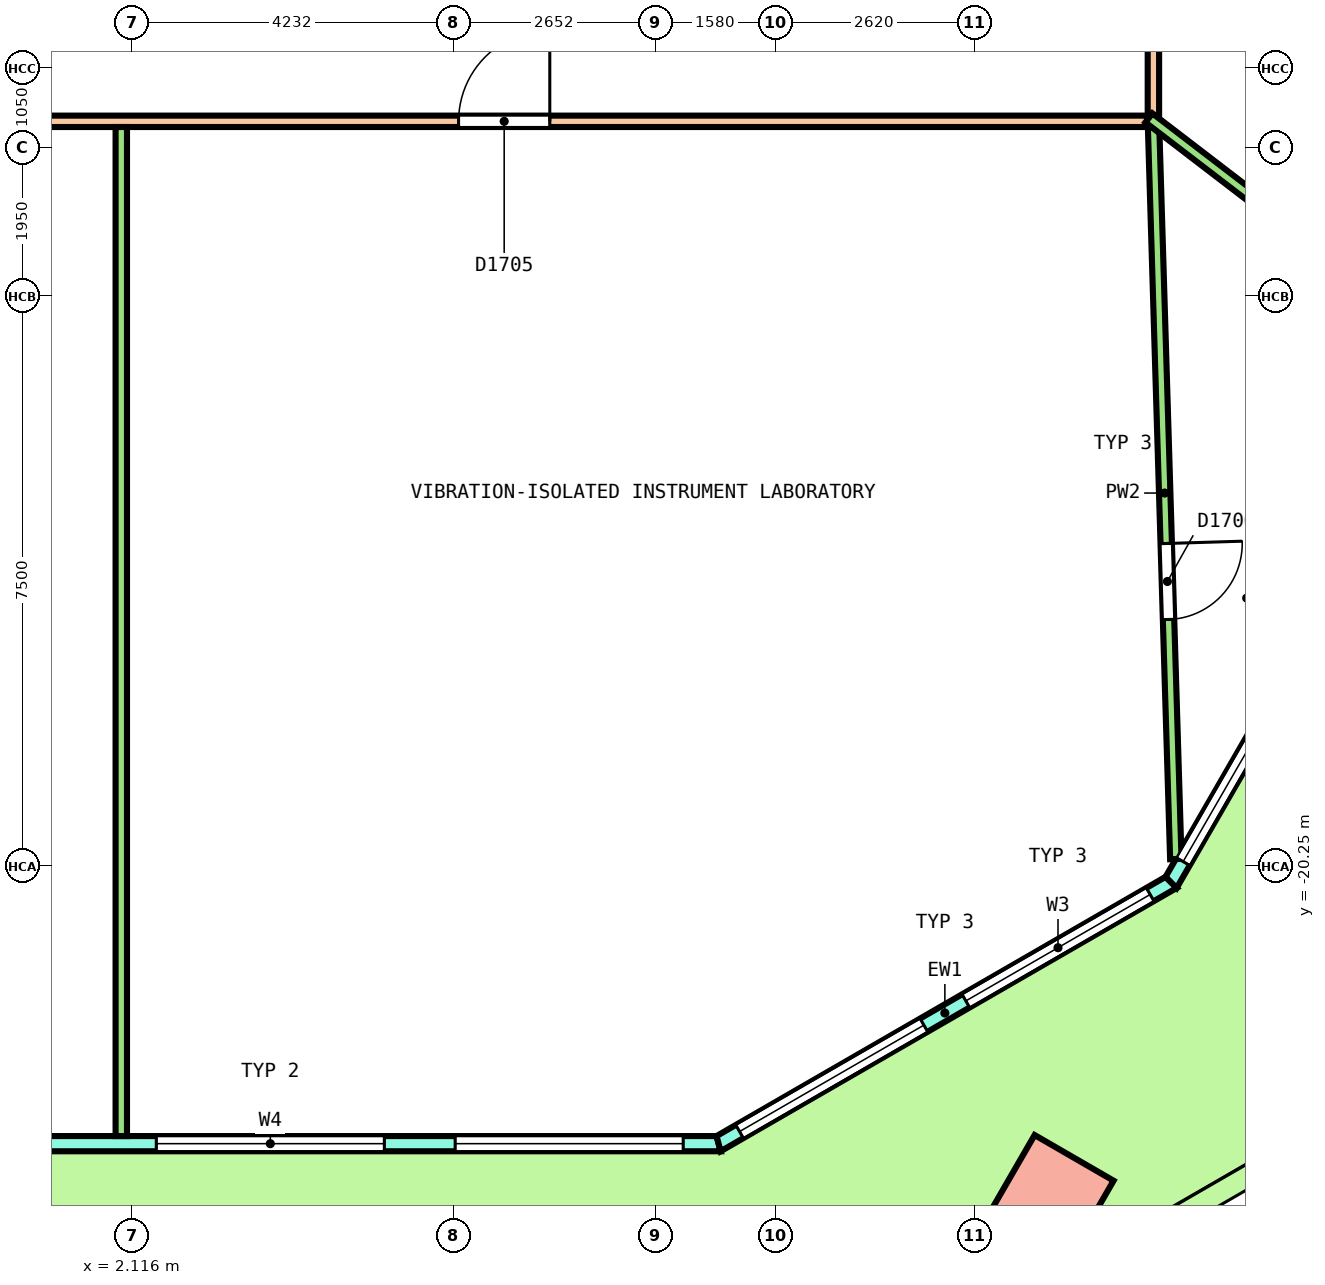
"""IFC4 building model, lengths in metres.
Left out: names, types, materials, properties, quantities, classifications, styles, units other than length and angle.
Written with IfcOpenShell. Run it as: python <this file> out.ifc"""

import sys

from ifc_helpers import new_model, si_unit, direction, frame, frame_2d, origin, origin_2d, place, context, subcontext, project, spatial, polyline, rectangle, outline, extrude, element, fill, save


model = new_model("IFC4")
c1 = context("Model", 3, precision=1e-05, world=origin(), true_north=direction((0.0, 1.0)))
c2 = subcontext(c1, "Body", "Model", "MODEL_VIEW")
j1 = project(units=[si_unit("LENGTHUNIT", "METRE"), si_unit("PLANEANGLEUNIT", "RADIAN")], contexts=[c1])
p1 = place(None, origin())
s1 = spatial("IfcSite", under=j1, at=p1, CompositionType="ELEMENT")
p2 = place(p1, origin())
s2 = spatial("IfcBuilding", under=s1, at=p2, CompositionType="ELEMENT")
p3 = place(p2, frame((0.0, 0.0, 145.2)))
s3 = spatial("IfcBuildingStorey", under=s2, at=p3, CompositionType="ELEMENT", Elevation=145.2)
p4 = place(p3, frame((14.206, -24.606, 0.0), z_axis=(-0.018132630042, -0.031385715123, 0.999342856388), x_axis=(0.866156195426, 0.498787200508, 0.031381104725)))
e1 = element("IfcColumn", 1, at=p4, inside=s3, PredefinedType="COLUMN", context=c2, shape_type="SweptSolid", body=[
    extrude(rectangle(XDim=1.2, YDim=1.2, at=origin_2d()), origin(), (0.0, 0.0, 1.0), 4.053),
])
p5 = place(p3, frame((-9.83, -23.9, 0.0), z_axis=(0.0, 0.0, 1.0), x_axis=(1.0, 0.0, 0.0)))
e2 = element("IfcWall", 2, at=p5, inside=s3, PredefinedType="SOLIDWALL", context=c2, shape_type="SweptSolid", body=[
    extrude(outline(polyline([(-0.027, -0.1), (1.011, -0.1), (2.048, -0.1), (3.086, -0.1), (4.123, -0.1), (5.161, -0.1), (6.198, -0.1), (7.236, -0.1), (8.273, -0.1), (9.311, -0.1), (10.348, -0.1), (11.386, -0.1), (12.423, -0.1), (13.461, -0.1), (14.499, -0.1), (15.536, -0.1), (16.573, -0.1), (17.611, -0.1), (18.648, -0.1), (19.686, -0.1), (19.632, 0.1), (18.6, 0.1), (17.569, 0.1), (16.537, 0.1), (15.505, 0.1), (14.473, 0.1), (13.441, 0.1), (12.409, 0.1), (11.377, 0.1), (10.345, 0.1), (9.314, 0.1), (8.282, 0.1), (7.25, 0.1), (6.218, 0.1), (5.186, 0.1), (4.154, 0.1), (3.123, 0.1), (2.091, 0.1), (1.059, 0.1), (0.027, 0.1), (-0.027, -0.1)])), origin(), (0.0, 0.0, 1.0), 4.1),
])
p6 = place(p5, frame((0.466, 0.0, 0.1)))
e3 = element("IfcOpeningElement", 3, at=p6, cuts=e2, PredefinedType="OPENING", context=c2, shape_type="SweptSolid", body=[
    extrude(rectangle(XDim=3.0, YDim=2.9, at=frame_2d((1.5, 1.45))), frame((0.0, 0.11, 0.0), z_axis=(0.0, -1.0, 0.0), x_axis=(1.0, 0.0, 0.0)), (0.0, 0.0, 1.0), 0.22),
])
p7 = place(p5, frame((4.398, 0.0, 0.1)))
e4 = element("IfcOpeningElement", 4, at=p7, cuts=e2, PredefinedType="OPENING", context=c2, shape_type="SweptSolid", body=[
    extrude(rectangle(XDim=3.0, YDim=2.9, at=frame_2d((1.5, 1.45))), frame((0.0, 0.11, 0.0), z_axis=(0.0, -1.0, 0.0), x_axis=(1.0, 0.0, 0.0)), (0.0, 0.0, 1.0), 0.22),
])
p8 = place(p5, frame((8.93, 0.0, 0.0)))
e5 = element("IfcOpeningElement", 5, at=p8, cuts=e2, PredefinedType="OPENING", context=c2, shape_type="SweptSolid", body=[
    extrude(rectangle(XDim=1.8, YDim=2.4, at=frame_2d((0.9, 1.2))), frame((0.0, 0.11, 0.0), z_axis=(0.0, -1.0, 0.0), x_axis=(1.0, 0.0, 0.0)), (0.0, 0.0, 1.0), 0.22),
])
p9 = place(p5, frame((8.93, 0.0, 2.55)))
e6 = element("IfcOpeningElement", 6, at=p9, cuts=e2, PredefinedType="OPENING", context=c2, shape_type="SweptSolid", body=[
    extrude(rectangle(XDim=1.8, YDim=0.45, at=frame_2d((0.9, 0.225))), frame((0.0, 0.11, 0.0), z_axis=(0.0, -1.0, 0.0), x_axis=(1.0, 0.0, 0.0)), (0.0, 0.0, 1.0), 0.22),
])
p10 = place(p5, frame((12.261, 0.0, 0.1)))
e7 = element("IfcOpeningElement", 7, at=p10, cuts=e2, PredefinedType="OPENING", context=c2, shape_type="SweptSolid", body=[
    extrude(rectangle(XDim=3.0, YDim=2.9, at=frame_2d((1.5, 1.45))), frame((0.0, 0.11, 0.0), z_axis=(0.0, -1.0, 0.0), x_axis=(1.0, 0.0, 0.0)), (0.0, 0.0, 1.0), 0.22),
])
p11 = place(p5, frame((16.193, 0.0, 0.1)))
e8 = element("IfcOpeningElement", 8, at=p11, cuts=e2, PredefinedType="OPENING", context=c2, shape_type="SweptSolid", body=[
    extrude(rectangle(XDim=3.0, YDim=2.9, at=frame_2d((1.5, 1.45))), frame((0.0, 0.11, 0.0), z_axis=(0.0, -1.0, 0.0), x_axis=(1.0, 0.0, 0.0)), (0.0, 0.0, 1.0), 0.22),
])
p12 = place(p3, frame((9.83, -23.9, 0.0), z_axis=(0.0, 0.0, 1.0), x_axis=(0.866029458321, 0.49999297727, 0.0)))
e9 = element("IfcWall", 9, at=p12, inside=s3, PredefinedType="SOLIDWALL", context=c2, shape_type="SweptSolid", body=[
    extrude(outline(polyline([(-0.027, -0.1), (1.128, -0.1), (2.282, -0.1), (3.437, -0.1), (4.592, -0.1), (5.747, -0.1), (6.901, -0.1), (6.848, 0.1), (5.711, 0.1), (4.574, 0.1), (3.437, 0.1), (2.301, 0.1), (1.164, 0.1), (0.027, 0.1), (-0.027, -0.1)])), origin(), (0.0, 0.0, 1.0), 4.1),
])
p13 = place(p12, frame((0.319, 0.0, 0.1)))
e10 = element("IfcOpeningElement", 10, at=p13, cuts=e9, PredefinedType="OPENING", context=c2, shape_type="SweptSolid", body=[
    extrude(rectangle(XDim=2.8, YDim=2.9, at=frame_2d((1.4, 1.45))), frame((0.0, 0.11, 0.0), z_axis=(0.0, -1.0, 0.0), x_axis=(1.0, 0.0, 0.0)), (0.0, 0.0, 1.0), 0.22),
])
p14 = place(p12, frame((3.756, 0.0, 0.1)))
e11 = element("IfcOpeningElement", 11, at=p14, cuts=e9, PredefinedType="OPENING", context=c2, shape_type="SweptSolid", body=[
    extrude(rectangle(XDim=2.8, YDim=2.9, at=frame_2d((1.4, 1.45))), frame((0.0, 0.11, 0.0), z_axis=(0.0, -1.0, 0.0), x_axis=(1.0, 0.0, 0.0)), (0.0, 0.0, 1.0), 0.22),
])
p15 = place(p3, frame((15.783, -20.463, 0.0), z_axis=(0.0, 0.0, 1.0), x_axis=(0.499999083763, 0.866025932773, 0.0)))
e12 = element("IfcWall", 12, at=p15, inside=s3, PredefinedType="SOLIDWALL", context=c2, shape_type="SweptSolid", body=[
    extrude(outline(polyline([(-0.027, -0.1), (1.011, -0.1), (2.048, -0.1), (3.086, -0.1), (4.123, -0.1), (5.161, -0.1), (6.198, -0.1), (7.236, -0.1), (8.273, -0.1), (9.311, -0.1), (10.348, -0.1), (11.386, -0.1), (12.423, -0.1), (13.461, -0.1), (14.499, -0.1), (15.536, -0.1), (16.573, -0.1), (17.611, -0.1), (18.648, -0.1), (19.686, -0.1), (19.632, 0.1), (18.6, 0.1), (17.569, 0.1), (16.537, 0.1), (15.505, 0.1), (14.473, 0.1), (13.441, 0.1), (12.409, 0.1), (11.377, 0.1), (10.345, 0.1), (9.314, 0.1), (8.282, 0.1), (7.25, 0.1), (6.218, 0.1), (5.186, 0.1), (4.154, 0.1), (3.123, 0.1), (2.091, 0.1), (1.059, 0.1), (0.027, 0.1), (-0.027, -0.1)])), origin(), (0.0, 0.0, 1.0), 4.1),
])
p16 = place(p15, frame((0.316, 0.0, 0.1)))
e13 = element("IfcOpeningElement", 13, at=p16, cuts=e12, PredefinedType="OPENING", context=c2, shape_type="SweptSolid", body=[
    extrude(rectangle(XDim=3.3, YDim=2.9, at=frame_2d((1.65, 1.45))), frame((0.0, 0.11, 0.0), z_axis=(0.0, -1.0, 0.0), x_axis=(1.0, 0.0, 0.0)), (0.0, 0.0, 1.0), 0.22),
])
p17 = place(p15, frame((4.248, 0.0, 0.1)))
e14 = element("IfcOpeningElement", 14, at=p17, cuts=e12, PredefinedType="OPENING", context=c2, shape_type="SweptSolid", body=[
    extrude(rectangle(XDim=3.3, YDim=2.9, at=frame_2d((1.65, 1.45))), frame((0.0, 0.11, 0.0), z_axis=(0.0, -1.0, 0.0), x_axis=(1.0, 0.0, 0.0)), (0.0, 0.0, 1.0), 0.22),
])
p18 = place(p15, frame((8.93, 0.0, 0.0)))
e15 = element("IfcOpeningElement", 15, at=p18, cuts=e12, PredefinedType="OPENING", context=c2, shape_type="SweptSolid", body=[
    extrude(rectangle(XDim=1.8, YDim=2.4, at=frame_2d((0.9, 1.2))), frame((0.0, 0.11, 0.0), z_axis=(0.0, -1.0, 0.0), x_axis=(1.0, 0.0, 0.0)), (0.0, 0.0, 1.0), 0.22),
])
p19 = place(p15, frame((8.93, 0.0, 2.55)))
e16 = element("IfcOpeningElement", 16, at=p19, cuts=e12, PredefinedType="OPENING", context=c2, shape_type="SweptSolid", body=[
    extrude(rectangle(XDim=1.8, YDim=0.45, at=frame_2d((0.9, 0.225))), frame((0.0, 0.11, 0.0), z_axis=(0.0, -1.0, 0.0), x_axis=(1.0, 0.0, 0.0)), (0.0, 0.0, 1.0), 0.22),
])
p20 = place(p15, frame((12.112, 0.0, 0.1)))
e17 = element("IfcOpeningElement", 17, at=p20, cuts=e12, PredefinedType="OPENING", context=c2, shape_type="SweptSolid", body=[
    extrude(rectangle(XDim=3.3, YDim=2.9, at=frame_2d((1.65, 1.45))), frame((0.0, 0.11, 0.0), z_axis=(0.0, -1.0, 0.0), x_axis=(1.0, 0.0, 0.0)), (0.0, 0.0, 1.0), 0.22),
])
p21 = place(p15, frame((16.043, 0.0, 0.1)))
e18 = element("IfcOpeningElement", 18, at=p21, cuts=e12, PredefinedType="OPENING", context=c2, shape_type="SweptSolid", body=[
    extrude(rectangle(XDim=3.3, YDim=2.9, at=frame_2d((1.65, 1.45))), frame((0.0, 0.11, 0.0), z_axis=(0.0, -1.0, 0.0), x_axis=(1.0, 0.0, 0.0)), (0.0, 0.0, 1.0), 0.22),
])
p22 = place(p3, frame((15.55, -10.375, 0.0), z_axis=(0.0, 0.0, 1.0), x_axis=(0.0, 1.0, 0.0)))
e19 = element("IfcWall", 19, at=p22, inside=s3, PredefinedType="PARTITIONING", context=c2, shape_type="SweptSolid", body=[
    extrude(rectangle(XDim=7.718, YDim=0.15, at=frame_2d((3.859, 0.0))), origin(), (0.0, 0.0, 1.0), 3.05),
])
p23 = place(p3, frame((-15.475, -10.45, 0.0), z_axis=(0.0, 0.0, 1.0), x_axis=(1.0, 0.0, 0.0)))
e20 = element("IfcWall", 20, at=p23, inside=s3, PredefinedType="PARTITIONING", context=c2, shape_type="SweptSolid", body=[
    extrude(rectangle(XDim=30.95, YDim=0.15, at=frame_2d((15.475, 0.0))), origin(), (0.0, 0.0, 1.0), 3.05),
])
p24 = place(p23, frame((10.429, 0.0, 0.0)))
e21 = element("IfcOpeningElement", 21, at=p24, cuts=e20, PredefinedType="OPENING", context=c2, shape_type="SweptSolid", body=[
    extrude(rectangle(XDim=1.2, YDim=2.1, at=frame_2d((0.6, 1.05))), frame((0.0, 0.085, 0.0), z_axis=(0.0, -1.0, 0.0), x_axis=(1.0, 0.0, 0.0)), (0.0, 0.0, 1.0), 0.17),
])
p25 = place(p23, frame((21.884, 0.0, 0.0)))
e22 = element("IfcOpeningElement", 22, at=p25, cuts=e20, PredefinedType="OPENING", context=c2, shape_type="SweptSolid", body=[
    extrude(rectangle(XDim=1.2, YDim=2.1, at=frame_2d((0.6, 1.05))), frame((0.0, 0.085, 0.0), z_axis=(0.0, -1.0, 0.0), x_axis=(1.0, 0.0, 0.0)), (0.0, 0.0, 1.0), 0.17),
])
p26 = place(p3, frame((1.971, -23.8, 0.0), z_axis=(0.0, 0.0, 1.0), x_axis=(0.0, 1.0, 0.0)))
e23 = element("IfcWall", 23, at=p26, inside=s3, PredefinedType="PARTITIONING", context=c2, shape_type="SweptSolid", body=[
    extrude(rectangle(XDim=13.275, YDim=0.15, at=frame_2d((6.638, 0.0))), origin(), (0.0, 0.0, 1.0), 3.05),
])
p27 = place(p3, frame((15.552, -10.525, 0.0), z_axis=(0.0, 0.0, 1.0), x_axis=(0.030379644099, -0.99953843209, 0.0)))
e24 = element("IfcWall", 24, at=p27, inside=s3, PredefinedType="PARTITIONING", context=c2, shape_type="SweptSolid", body=[
    extrude(rectangle(XDim=9.635, YDim=0.15, at=frame_2d((4.818, 0.0))), origin(), (0.0, 0.0, 1.0), 3.05),
])
p28 = place(p27, frame((5.482, 0.0, 0.0)))
e25 = element("IfcOpeningElement", 25, at=p28, cuts=e24, PredefinedType="OPENING", context=c2, shape_type="SweptSolid", body=[
    extrude(rectangle(XDim=1.0, YDim=2.1, at=frame_2d((0.5, 1.05))), frame((0.0, 0.085, 0.0), z_axis=(0.0, -1.0, 0.0), x_axis=(1.0, 0.0, 0.0)), (0.0, 0.0, 1.0), 0.17),
])
p29 = place(p3, frame((15.49, -10.404, 0.0), z_axis=(0.0, 0.0, 1.0), x_axis=(0.793633423359, -0.608396243683, 0.0)))
e26 = element("IfcWall", 26, at=p29, inside=s3, PredefinedType="PARTITIONING", context=c2, shape_type="SweptSolid", body=[
    extrude(rectangle(XDim=5.227, YDim=0.15, at=frame_2d((2.614, 0.0))), origin(), (0.0, 0.0, 1.0), 3.05),
])
p30 = place(p10, origin())
e27 = element("IfcWindow", 27, at=p30, inside=s3, PartitioningType="SINGLE_PANEL", PredefinedType="WINDOW", context=c2, shape_type="SweptSolid", body=[
    extrude(rectangle(XDim=3.0, YDim=2.9, at=frame_2d((1.5, 1.45))), frame((0.0, 0.03, 0.0), z_axis=(0.0, -1.0, 0.0), x_axis=(1.0, 0.0, 0.0)), (0.0, 0.0, 1.0), 0.06),
])
fill(e7, e27)
p31 = place(p11, origin())
e28 = element("IfcWindow", 28, at=p31, inside=s3, PartitioningType="SINGLE_PANEL", PredefinedType="WINDOW", context=c2, shape_type="SweptSolid", body=[
    extrude(rectangle(XDim=3.0, YDim=2.9, at=frame_2d((1.5, 1.45))), frame((0.0, 0.03, 0.0), z_axis=(0.0, -1.0, 0.0), x_axis=(1.0, 0.0, 0.0)), (0.0, 0.0, 1.0), 0.06),
])
fill(e8, e28)
p32 = place(p13, origin())
e29 = element("IfcWindow", 29, at=p32, inside=s3, PartitioningType="SINGLE_PANEL", PredefinedType="WINDOW", context=c2, shape_type="SweptSolid", body=[
    extrude(rectangle(XDim=2.8, YDim=2.9, at=frame_2d((1.4, 1.45))), frame((0.0, 0.03, 0.0), z_axis=(0.0, -1.0, 0.0), x_axis=(1.0, 0.0, 0.0)), (0.0, 0.0, 1.0), 0.06),
])
fill(e10, e29)
p33 = place(p14, origin())
e30 = element("IfcWindow", 30, at=p33, inside=s3, PartitioningType="SINGLE_PANEL", PredefinedType="WINDOW", context=c2, shape_type="SweptSolid", body=[
    extrude(rectangle(XDim=2.8, YDim=2.9, at=frame_2d((1.4, 1.45))), frame((0.0, 0.03, 0.0), z_axis=(0.0, -1.0, 0.0), x_axis=(1.0, 0.0, 0.0)), (0.0, 0.0, 1.0), 0.06),
])
fill(e11, e30)
p34 = place(p16, origin())
e31 = element("IfcWindow", 31, at=p34, inside=s3, PartitioningType="SINGLE_PANEL", PredefinedType="WINDOW", context=c2, shape_type="SweptSolid", body=[
    extrude(rectangle(XDim=3.3, YDim=2.9, at=frame_2d((1.65, 1.45))), frame((0.0, 0.03, 0.0), z_axis=(0.0, -1.0, 0.0), x_axis=(1.0, 0.0, 0.0)), (0.0, 0.0, 1.0), 0.06),
])
fill(e13, e31)
p35 = place(p25, origin())
e32 = element("IfcDoor", 32, at=p35, inside=s3, OperationType="DOUBLE_DOOR_SINGLE_SWING", PredefinedType="DOOR", context=c2, shape_type="SweptSolid", body=[
    extrude(rectangle(XDim=1.2, YDim=2.1, at=frame_2d((0.6, 1.05))), frame((0.0, 0.025, 0.0), z_axis=(0.0, -1.0, 0.0), x_axis=(1.0, 0.0, 0.0)), (0.0, 0.0, 1.0), 0.05),
])
fill(e22, e32)
p36 = place(p28, origin())
e33 = element("IfcDoor", 33, at=p36, inside=s3, OperationType="SINGLE_SWING_RIGHT", PredefinedType="DOOR", context=c2, shape_type="SweptSolid", body=[
    extrude(rectangle(XDim=1.0, YDim=2.1, at=frame_2d((0.5, 1.05))), frame((0.0, 0.025, 0.0), z_axis=(0.0, -1.0, 0.0), x_axis=(1.0, 0.0, 0.0)), (0.0, 0.0, 1.0), 0.05),
])
fill(e25, e33)
save(model, sys.argv[1])
